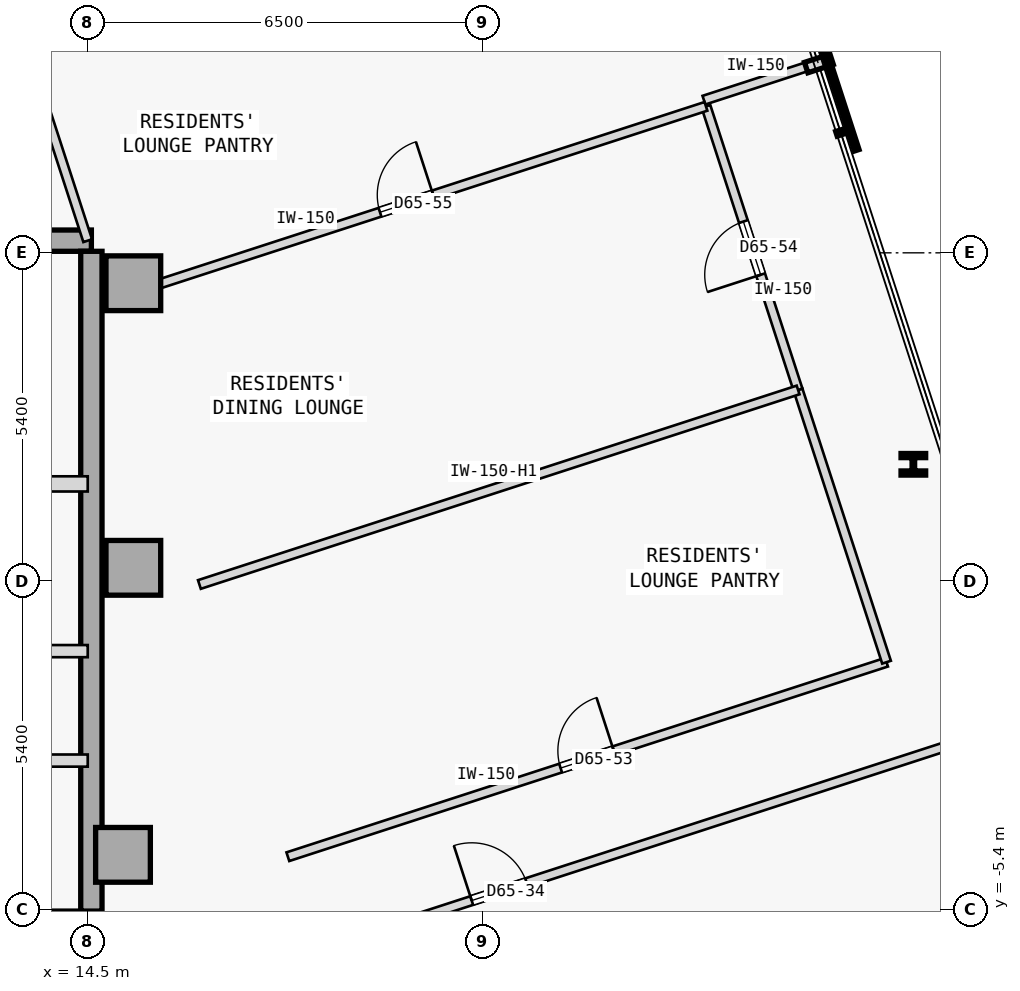
"""IFC4 building model, lengths in metres.
Left out: names, types, materials, properties, quantities, classifications, styles, units other than length and angle.
Written with IfcOpenShell. Run it as: python <this file> out.ifc"""

import sys

from ifc_helpers import new_model, si_unit, direction, frame, frame_2d, origin, origin_2d, place, context, subcontext, project, spatial, rectangle, i_section, extrude, element, fill, save


model = new_model("IFC4")
c1 = context("Model", 3, precision=1e-05, world=origin(), true_north=direction((0.0, 1.0)))
c2 = subcontext(c1, "Body", "Model", "MODEL_VIEW")
j1 = project(units=[si_unit("LENGTHUNIT", "METRE"), si_unit("PLANEANGLEUNIT", "RADIAN")], contexts=[c1])
p1 = place(None, origin())
s1 = spatial("IfcSite", under=j1, at=p1, CompositionType="ELEMENT")
p2 = place(p1, origin())
s2 = spatial("IfcBuilding", under=s1, at=p2, CompositionType="ELEMENT")
p3 = place(p2, frame((0.0, 0.0, 244.4)))
s3 = spatial("IfcBuildingStorey", under=s2, at=p3, CompositionType="ELEMENT", Elevation=244.4)
for number, where, z_axis, x_axis in (
    (1, (15.25, 4.9, 0.0), (0.0, 0.0, 1.0), (1.0, 0.0, 0.0)),
    (2, (15.25, 0.22, 0.0), (0.0, 0.0, 1.0), (1.0, 0.0, 0.0)),
    (3, (15.08, -4.5, 0.0), (0.0, 0.0, 1.0), (1.0, 0.0, 0.0)),
):
    element("IfcColumn", number, at=place(p3, frame(where, z_axis=z_axis, x_axis=x_axis)), inside=s3, PredefinedType="COLUMN", context=c2, shape_type="SweptSolid", body=[
        extrude(rectangle(XDim=0.9, YDim=0.9, at=origin_2d()), origin(), (0.0, 0.0, 1.0), 3.35),
    ])
p4 = place(p3, frame((3.15, 5.6, 0.0), z_axis=(0.0, 0.0, 1.0), x_axis=(1.0, 0.0, 0.0)))
e4 = element("IfcWall", 4, at=p4, inside=s3, PredefinedType="SHEAR", context=c2, shape_type="SweptSolid", body=[
    extrude(rectangle(XDim=11.41, YDim=0.35, at=frame_2d((5.705, 0.0))), origin(), (0.0, 0.0, 1.0), 3.125),
])
p5 = place(p3, frame((14.56, -5.425, 0.0), z_axis=(0.0, 0.0, 1.0), x_axis=(0.0, 1.0, 0.0)))
e5 = element("IfcWall", 5, at=p5, inside=s3, PredefinedType="SHEAR", context=c2, shape_type="SweptSolid", body=[
    extrude(rectangle(XDim=10.85, YDim=0.35, at=frame_2d((5.425, 0.0))), origin(), (0.0, 0.0, 1.0), 3.125),
])
p6 = place(p3, frame((28.078, 1.922, 0.0), z_axis=(0.0, 0.0, 1.0), x_axis=(1.0, 0.0, 0.0)))
e6 = element("IfcColumn", 6, at=p6, inside=s3, PredefinedType="COLUMN", context=c2, shape_type="SweptSolid", body=[
    extrude(i_section(OverallWidth=0.405, OverallDepth=0.355, WebThickness=0.042, FlangeThickness=0.068, FilletRadius=0.015, at=origin_2d()), origin(), (0.0, 0.0, 1.0), 3.35),
])
p7 = place(p3, frame((10.9, 1.6, 0.0), z_axis=(0.0, 0.0, 1.0), x_axis=(1.0, 0.0, 0.0)))
e7 = element("IfcWall", 7, at=p7, inside=s3, PredefinedType="STANDARD", context=c2, shape_type="SweptSolid", body=[
    extrude(rectangle(XDim=3.6, YDim=0.25, at=frame_2d((1.8, 0.0))), origin(), (0.0, 0.0, 1.0), 3.125),
])
p8 = place(p7, frame((1.62, 0.0, 0.0)))
e8 = element("IfcOpeningElement", 8, at=p8, cuts=e7, PredefinedType="OPENING", context=c2, shape_type="SweptSolid", body=[
    extrude(rectangle(XDim=1.05, YDim=2.15, at=frame_2d((0.525, 1.075))), frame((0.0, 0.135, 0.0), z_axis=(0.0, -1.0, 0.0), x_axis=(1.0, 0.0, 0.0)), (0.0, 0.0, 1.0), 0.27),
])
p9 = place(p3, frame((11.55, -1.15, 0.0), z_axis=(0.0, 0.0, 1.0), x_axis=(1.0, 0.0, 0.0)))
e9 = element("IfcWall", 9, at=p9, inside=s3, PredefinedType="STANDARD", context=c2, shape_type="SweptSolid", body=[
    extrude(rectangle(XDim=2.95, YDim=0.2, at=frame_2d((1.475, 0.0))), origin(), (0.0, 0.0, 1.0), 3.125),
])
p10 = place(p9, frame((0.75, 0.0, 0.0)))
e10 = element("IfcOpeningElement", 10, at=p10, cuts=e9, PredefinedType="OPENING", context=c2, shape_type="SweptSolid", body=[
    extrude(rectangle(XDim=1.05, YDim=2.18, at=frame_2d((0.525, 1.09))), frame((0.0, 0.11, 0.0), z_axis=(0.0, -1.0, 0.0), x_axis=(1.0, 0.0, 0.0)), (0.0, 0.0, 1.0), 0.22),
])
p11 = place(p3, frame((3.7, -2.95, 0.0), z_axis=(0.0, 0.0, 1.0), x_axis=(1.0, 0.0, 0.0)))
e11 = element("IfcWall", 11, at=p11, inside=s3, PredefinedType="STANDARD", context=c2, shape_type="SweptSolid", body=[
    extrude(rectangle(XDim=10.8, YDim=0.2, at=frame_2d((5.4, 0.0))), origin(), (0.0, 0.0, 1.0), 3.125),
])
p12 = place(p11, frame((0.53, 0.0, 0.0)))
e12 = element("IfcOpeningElement", 12, at=p12, cuts=e11, PredefinedType="OPENING", context=c2, shape_type="SweptSolid", body=[
    extrude(rectangle(XDim=1.1, YDim=2.15, at=frame_2d((0.55, 1.075))), frame((0.0, 0.11, 0.0), z_axis=(0.0, -1.0, 0.0), x_axis=(1.0, 0.0, 0.0)), (0.0, 0.0, 1.0), 0.22),
])
p13 = place(p11, frame((3.79, 0.0, 0.0)))
e13 = element("IfcOpeningElement", 13, at=p13, cuts=e11, PredefinedType="OPENING", context=c2, shape_type="SweptSolid", body=[
    extrude(rectangle(XDim=0.92, YDim=2.15, at=frame_2d((0.46, 1.075))), frame((0.0, 0.11, 0.0), z_axis=(0.0, -1.0, 0.0), x_axis=(1.0, 0.0, 0.0)), (0.0, 0.0, 1.0), 0.22),
])
p14 = place(p11, frame((8.11, 0.0, 0.0)))
e14 = element("IfcOpeningElement", 14, at=p14, cuts=e11, PredefinedType="OPENING", context=c2, shape_type="SweptSolid", body=[
    extrude(rectangle(XDim=0.92, YDim=2.15, at=frame_2d((0.46, 1.075))), frame((0.0, 0.11, 0.0), z_axis=(0.0, -1.0, 0.0), x_axis=(1.0, 0.0, 0.0)), (0.0, 0.0, 1.0), 0.22),
])
p15 = place(p3, frame((12.517, -7.948, 0.0), z_axis=(0.0, 0.0, 1.0), x_axis=(0.951053764264, 0.309025464128, 0.0)))
e15 = element("IfcWall", 15, at=p15, inside=s3, PredefinedType="PARTITIONING", context=c2, shape_type="SweptSolid", body=[
    extrude(rectangle(XDim=18.399, YDim=0.15, at=frame_2d((9.2, 0.0))), origin(), (0.0, 0.0, 1.0), 3.125),
])
p16 = place(p15, frame((8.725, 0.0, 0.0)))
e16 = element("IfcOpeningElement", 16, at=p16, cuts=e15, PredefinedType="OPENING", context=c2, shape_type="SweptSolid", body=[
    extrude(rectangle(XDim=0.95, YDim=2.15, at=frame_2d((0.475, 1.075))), frame((0.0, 0.085, 0.0), z_axis=(0.0, -1.0, 0.0), x_axis=(1.0, 0.0, 0.0)), (0.0, 0.0, 1.0), 0.17),
])
p17 = place(p3, frame((17.791, -4.531, 0.0), z_axis=(0.0, 0.0, 1.0), x_axis=(0.951056769902, 0.309016213852, 0.0)))
e17 = element("IfcWall", 17, at=p17, inside=s3, PredefinedType="PARTITIONING", context=c2, shape_type="SweptSolid", body=[
    extrude(rectangle(XDim=10.352, YDim=0.15, at=frame_2d((5.176, 0.0))), origin(), (0.0, 0.0, 1.0), 3.125),
])
p18 = place(p17, frame((4.716, 0.0, 0.0)))
e18 = element("IfcOpeningElement", 18, at=p18, cuts=e17, PredefinedType="OPENING", context=c2, shape_type="SweptSolid", body=[
    extrude(rectangle(XDim=0.92, YDim=2.15, at=frame_2d((0.46, 1.075))), frame((0.0, 0.085, 0.0), z_axis=(0.0, -1.0, 0.0), x_axis=(1.0, 0.0, 0.0)), (0.0, 0.0, 1.0), 0.17),
])
p19 = place(p3, frame((27.637, -1.332, 0.0), z_axis=(0.0, 0.0, 1.0), x_axis=(-0.309029776355, 0.951052363083, 0.0)))
e19 = element("IfcWall", 19, at=p19, inside=s3, PredefinedType="PARTITIONING", context=c2, shape_type="SweptSolid", body=[
    extrude(rectangle(XDim=4.707, YDim=0.15, at=frame_2d((2.354, 0.0))), origin(), (0.0, 0.0, 1.0), 3.125),
])
p20 = place(p3, frame((26.182, 3.145, 0.0), z_axis=(0.0, 0.0, 1.0), x_axis=(-0.309019653166, 0.951055652397, 0.0)))
e20 = element("IfcWall", 20, at=p20, inside=s3, PredefinedType="PARTITIONING", context=c2, shape_type="SweptSolid", body=[
    extrude(rectangle(XDim=4.904, YDim=0.15, at=frame_2d((2.452, 0.0))), origin(), (0.0, 0.0, 1.0), 3.125),
])
p21 = place(p20, frame((1.992, 0.0, 0.0)))
e21 = element("IfcOpeningElement", 21, at=p21, cuts=e20, PredefinedType="OPENING", context=c2, shape_type="SweptSolid", body=[
    extrude(rectangle(XDim=0.92, YDim=2.15, at=frame_2d((0.46, 1.075))), frame((0.0, 0.085, 0.0), z_axis=(0.0, -1.0, 0.0), x_axis=(1.0, 0.0, 0.0)), (0.0, 0.0, 1.0), 0.17),
])
p22 = place(p3, frame((24.634, 7.91, 0.0), z_axis=(0.0, 0.0, 1.0), x_axis=(0.951054051148, 0.309024581215, 0.0)))
e22 = element("IfcWall", 22, at=p22, inside=s3, PredefinedType="PARTITIONING", context=c2, shape_type="SweptSolid", body=[
    extrude(rectangle(XDim=1.975, YDim=0.15, at=frame_2d((0.988, 0.0))), origin(), (0.0, 0.0, 1.0), 3.125),
])
p23 = place(p3, frame((14.5, 5.6, 0.0), z_axis=(0.0, 0.0, 1.0), x_axis=(-0.309015253813, 0.951057081836, 0.0)))
e23 = element("IfcWall", 23, at=p23, inside=s3, PredefinedType="PARTITIONING", context=c2, shape_type="SweptSolid", body=[
    extrude(rectangle(XDim=3.274, YDim=0.15, at=frame_2d((1.637, 0.0))), origin(), (0.0, 0.0, 1.0), 3.125),
])
p24 = place(p3, frame((16.337, -0.054, 0.0), z_axis=(0.0, 0.0, 1.0), x_axis=(0.951056769902, 0.309016213852, 0.0)))
e24 = element("IfcWall", 24, at=p24, inside=s3, PredefinedType="PARTITIONING", context=c2, shape_type="SweptSolid", body=[
    extrude(rectangle(XDim=10.352, YDim=0.15, at=frame_2d((5.176, 0.0))), origin(), (0.0, 0.0, 1.0), 2.675),
])
p25 = place(p3, frame((14.821, 4.61, 0.0), z_axis=(0.0, 0.0, 1.0), x_axis=(0.951063700751, 0.30899488202, 0.0)))
e25 = element("IfcWall", 25, at=p25, inside=s3, PredefinedType="PARTITIONING", context=c2, shape_type="SweptSolid", body=[
    extrude(rectangle(XDim=10.352, YDim=0.15, at=frame_2d((5.176, 0.0))), origin(), (0.0, 0.0, 1.0), 3.125),
])
p26 = place(p25, frame((4.716, 0.0, 0.0)))
e26 = element("IfcOpeningElement", 26, at=p26, cuts=e25, PredefinedType="OPENING", context=c2, shape_type="SweptSolid", body=[
    extrude(rectangle(XDim=0.92, YDim=2.15, at=frame_2d((0.46, 1.075))), frame((0.0, 0.085, 0.0), z_axis=(0.0, -1.0, 0.0), x_axis=(1.0, 0.0, 0.0)), (0.0, 0.0, 1.0), 0.17),
])
p27 = place(p3, frame((13.488, 8.714, 0.0), z_axis=(0.0, 0.0, 1.0), x_axis=(0.951062154725, 0.308999640533, 0.0)))
e27 = element("IfcWall", 27, at=p27, inside=s3, PredefinedType="PARTITIONING", context=c2, shape_type="SweptSolid", body=[
    extrude(rectangle(XDim=12.327, YDim=0.15, at=frame_2d((6.164, 0.0))), origin(), (0.0, 0.0, 1.0), 3.125),
])
p28 = place(p27, frame((5.704, 0.0, 0.0)))
e28 = element("IfcOpeningElement", 28, at=p28, cuts=e27, PredefinedType="OPENING", context=c2, shape_type="SweptSolid", body=[
    extrude(rectangle(XDim=0.92, YDim=2.15, at=frame_2d((0.46, 1.075))), frame((0.0, 0.085, 0.0), z_axis=(0.0, -1.0, 0.0), x_axis=(1.0, 0.0, 0.0)), (0.0, 0.0, 1.0), 0.17),
])
p29 = place(p16, origin())
e29 = element("IfcDoor", 29, at=p29, inside=s3, OperationType="SINGLE_SWING_LEFT", PredefinedType="DOOR", context=c2, shape_type="SweptSolid", body=[
    extrude(rectangle(XDim=0.95, YDim=2.15, at=frame_2d((0.475, 1.075))), frame((0.0, 0.025, 0.0), z_axis=(0.0, -1.0, 0.0), x_axis=(1.0, 0.0, 0.0)), (0.0, 0.0, 1.0), 0.05),
])
fill(e16, e29)
p30 = place(p18, origin())
e30 = element("IfcDoor", 30, at=p30, inside=s3, OperationType="SINGLE_SWING_RIGHT", PredefinedType="DOOR", context=c2, shape_type="SweptSolid", body=[
    extrude(rectangle(XDim=0.92, YDim=2.15, at=frame_2d((0.46, 1.075))), frame((0.0, 0.025, 0.0), z_axis=(0.0, -1.0, 0.0), x_axis=(1.0, 0.0, 0.0)), (0.0, 0.0, 1.0), 0.05),
])
fill(e18, e30)
p31 = place(p21, origin())
e31 = element("IfcDoor", 31, at=p31, inside=s3, OperationType="SINGLE_SWING_LEFT", PredefinedType="DOOR", context=c2, shape_type="SweptSolid", body=[
    extrude(rectangle(XDim=0.92, YDim=2.15, at=frame_2d((0.46, 1.075))), frame((0.0, 0.025, 0.0), z_axis=(0.0, -1.0, 0.0), x_axis=(1.0, 0.0, 0.0)), (0.0, 0.0, 1.0), 0.05),
])
fill(e21, e31)
p32 = place(p26, origin())
e32 = element("IfcDoor", 32, at=p32, inside=s3, OperationType="SINGLE_SWING_RIGHT", PredefinedType="DOOR", context=c2, shape_type="SweptSolid", body=[
    extrude(rectangle(XDim=0.92, YDim=2.15, at=frame_2d((0.46, 1.075))), frame((0.0, 0.025, 0.0), z_axis=(0.0, -1.0, 0.0), x_axis=(1.0, 0.0, 0.0)), (0.0, 0.0, 1.0), 0.05),
])
fill(e26, e32)
save(model, sys.argv[1])
